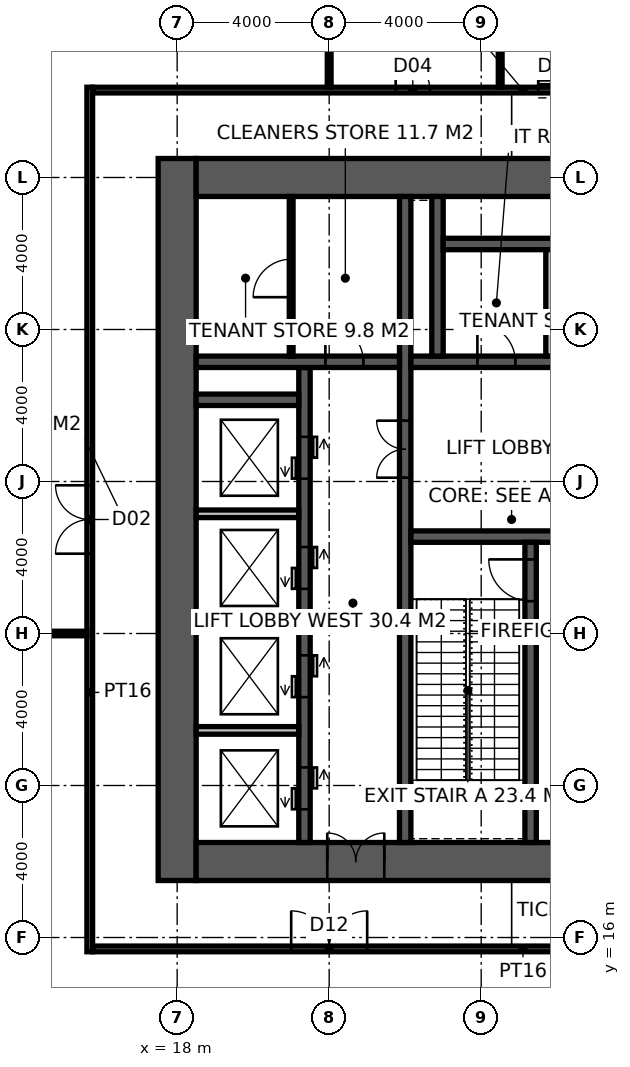
"""IFC4 building model, lengths in metres.
Left out: names, types, materials, properties, quantities, classifications, styles, units other than length and angle.
Written with IfcOpenShell. Run it as: python <this file> out.ifc"""

import sys

from ifc_helpers import new_model, si_unit, direction, frame, frame_2d, origin, place, context, subcontext, project, spatial, rectangle, extrude, element, fill, save


model = new_model("IFC4")
c1 = context("Model", 3, precision=1e-05, world=origin(), true_north=direction((0.0, 1.0)))
c2 = subcontext(c1, "Body", "Model", "MODEL_VIEW")
j1 = project(units=[si_unit("LENGTHUNIT", "METRE"), si_unit("PLANEANGLEUNIT", "RADIAN")], contexts=[c1])
p1 = place(None, origin())
s1 = spatial("IfcSite", under=j1, at=p1, CompositionType="ELEMENT")
p2 = place(p1, origin())
s2 = spatial("IfcBuilding", under=s1, at=p2, CompositionType="ELEMENT")
p3 = place(p2, frame((0.0, 0.0, 298.2)))
s3 = spatial("IfcBuildingStorey", under=s2, at=p3, CompositionType="ELEMENT", Elevation=298.2)
p4 = place(p3, frame((18.0, 17.5, -0.15), z_axis=(0.0, 0.0, 1.0), x_axis=(0.0, 1.0, 0.0)))
e1 = element("IfcWall", 1, at=p4, inside=s3, PredefinedType="SHEAR", context=c2, shape_type="SweptSolid", body=[
    extrude(rectangle(XDim=19.0, YDim=1.0, at=frame_2d((9.5, 0.0))), origin(), (0.0, 0.0, 1.0), 5.85),
])
p5 = place(p3, frame((18.5, 18.0, -0.15), z_axis=(0.0, 0.0, 1.0), x_axis=(1.0, 0.0, 0.0)))
e2 = element("IfcWall", 2, at=p5, inside=s3, PredefinedType="SHEAR", context=c2, shape_type="SweptSolid", body=[
    extrude(rectangle(XDim=17.6, YDim=1.0, at=frame_2d((8.8, 0.0))), origin(), (0.0, 0.0, 1.0), 5.85),
])
p6 = place(p5, frame((3.45, 0.0, 0.15)))
e3 = element("IfcOpeningElement", 3, at=p6, cuts=e2, PredefinedType="OPENING", context=c2, shape_type="SweptSolid", body=[
    extrude(rectangle(XDim=1.5, YDim=2.4, at=frame_2d((0.75, 1.2))), frame((0.0, 0.51, 0.0), z_axis=(0.0, -1.0, 0.0), x_axis=(1.0, 0.0, 0.0)), (0.0, 0.0, 1.0), 1.02),
])
p7 = place(p3, frame((18.5, 36.0, -0.15), z_axis=(0.0, 0.0, 1.0), x_axis=(1.0, 0.0, 0.0)))
e4 = element("IfcWall", 4, at=p7, inside=s3, PredefinedType="SHEAR", context=c2, shape_type="SweptSolid", body=[
    extrude(rectangle(XDim=17.6, YDim=1.0, at=frame_2d((8.8, 0.0))), origin(), (0.0, 0.0, 1.0), 5.85),
])
p8 = place(p3, frame((24.0, 18.5, -0.15), z_axis=(0.0, 0.0, 1.0), x_axis=(0.0, 1.0, 0.0)))
e5 = element("IfcWall", 5, at=p8, inside=s3, PredefinedType="SHEAR", context=c2, shape_type="SweptSolid", body=[
    extrude(rectangle(XDim=17.0, YDim=0.3, at=frame_2d((8.5, 0.0))), origin(), (0.0, 0.0, 1.0), 5.85),
])
p9 = place(p8, frame((9.6, 0.0, 0.15)))
e6 = element("IfcOpeningElement", 6, at=p9, cuts=e5, PredefinedType="OPENING", context=c2, shape_type="SweptSolid", body=[
    extrude(rectangle(XDim=1.5, YDim=2.4, at=frame_2d((0.75, 1.2))), frame((0.0, 0.16, 0.0), z_axis=(0.0, -1.0, 0.0), x_axis=(1.0, 0.0, 0.0)), (0.0, 0.0, 1.0), 0.32),
])
p10 = place(p3, frame((24.15, 26.55, -0.15), z_axis=(0.0, 0.0, 1.0), x_axis=(1.0, 0.0, 0.0)))
e7 = element("IfcWall", 7, at=p10, inside=s3, PredefinedType="SHEAR", context=c2, shape_type="SweptSolid", body=[
    extrude(rectangle(XDim=11.25, YDim=0.3, at=frame_2d((5.625, 0.0))), origin(), (0.0, 0.0, 1.0), 5.85),
])
p11 = place(p10, frame((9.2, 0.0, 0.15)))
e8 = element("IfcOpeningElement", 8, at=p11, cuts=e7, PredefinedType="OPENING", context=c2, shape_type="SweptSolid", body=[
    extrude(rectangle(XDim=1.1, YDim=2.2, at=frame_2d((0.55, 1.1))), frame((0.0, 0.16, 0.0), z_axis=(0.0, -1.0, 0.0), x_axis=(1.0, 0.0, 0.0)), (0.0, 0.0, 1.0), 0.32),
])
p12 = place(p10, frame((4.9, 0.0, 0.15)))
e9 = element("IfcOpeningElement", 9, at=p12, cuts=e7, PredefinedType="OPENING", context=c2, shape_type="SweptSolid", body=[
    extrude(rectangle(XDim=1.5, YDim=2.4, at=frame_2d((0.75, 1.2))), frame((0.0, 0.16, 0.0), z_axis=(0.0, -1.0, 0.0), x_axis=(1.0, 0.0, 0.0)), (0.0, 0.0, 1.0), 0.32),
])
p13 = place(p3, frame((27.3, 18.5, -0.15), z_axis=(0.0, 0.0, 1.0), x_axis=(0.0, 1.0, 0.0)))
e10 = element("IfcWall", 10, at=p13, inside=s3, PredefinedType="SHEAR", context=c2, shape_type="SweptSolid", body=[
    extrude(rectangle(XDim=7.9, YDim=0.3, at=frame_2d((3.95, 0.0))), origin(), (0.0, 0.0, 1.0), 5.85),
])
p14 = place(p13, frame((6.35, 0.0, 0.15)))
e11 = element("IfcOpeningElement", 11, at=p14, cuts=e10, PredefinedType="OPENING", context=c2, shape_type="SweptSolid", body=[
    extrude(rectangle(XDim=1.1, YDim=2.2, at=frame_2d((0.55, 1.1))), frame((0.0, 0.16, 0.0), z_axis=(0.0, -1.0, 0.0), x_axis=(1.0, 0.0, 0.0)), (0.0, 0.0, 1.0), 0.32),
])
p15 = place(p3, frame((24.15, 31.15, -0.15), z_axis=(0.0, 0.0, 1.0), x_axis=(1.0, 0.0, 0.0)))
e12 = element("IfcWall", 12, at=p15, inside=s3, PredefinedType="SHEAR", context=c2, shape_type="SweptSolid", body=[
    extrude(rectangle(XDim=11.25, YDim=0.3, at=frame_2d((5.625, 0.0))), origin(), (0.0, 0.0, 1.0), 5.85),
])
p16 = place(p15, frame((1.75, 0.0, 0.15)))
e13 = element("IfcOpeningElement", 13, at=p16, cuts=e12, PredefinedType="OPENING", context=c2, shape_type="SweptSolid", body=[
    extrude(rectangle(XDim=1.0, YDim=2.2, at=frame_2d((0.5, 1.1))), frame((0.0, 0.16, 0.0), z_axis=(0.0, -1.0, 0.0), x_axis=(1.0, 0.0, 0.0)), (0.0, 0.0, 1.0), 0.32),
])
p17 = place(p15, frame((4.55, 0.0, 0.15)))
e14 = element("IfcOpeningElement", 14, at=p17, cuts=e12, PredefinedType="OPENING", context=c2, shape_type="SweptSolid", body=[
    extrude(rectangle(XDim=1.0, YDim=2.2, at=frame_2d((0.5, 1.1))), frame((0.0, 0.16, 0.0), z_axis=(0.0, -1.0, 0.0), x_axis=(1.0, 0.0, 0.0)), (0.0, 0.0, 1.0), 0.32),
])
p18 = place(p15, frame((7.25, 0.0, 0.15)))
e15 = element("IfcOpeningElement", 15, at=p18, cuts=e12, PredefinedType="OPENING", context=c2, shape_type="SweptSolid", body=[
    extrude(rectangle(XDim=1.4, YDim=2.4, at=frame_2d((0.7, 1.2))), frame((0.0, 0.16, 0.0), z_axis=(0.0, -1.0, 0.0), x_axis=(1.0, 0.0, 0.0)), (0.0, 0.0, 1.0), 0.32),
])
p19 = place(p3, frame((21.35, 18.5, -0.15), z_axis=(0.0, 0.0, 1.0), x_axis=(0.0, 1.0, 0.0)))
e16 = element("IfcWall", 16, at=p19, inside=s3, PredefinedType="SHEAR", context=c2, shape_type="SweptSolid", body=[
    extrude(rectangle(XDim=12.5, YDim=0.3, at=frame_2d((6.25, 0.0))), origin(), (0.0, 0.0, 1.0), 5.85),
])
p20 = place(p19, frame((0.875, 0.0, 0.15)))
e17 = element("IfcOpeningElement", 17, at=p20, cuts=e16, PredefinedType="OPENING", context=c2, shape_type="SweptSolid", body=[
    extrude(rectangle(XDim=1.1, YDim=2.2, at=frame_2d((0.55, 1.1))), frame((0.0, 0.16, 0.0), z_axis=(0.0, -1.0, 0.0), x_axis=(1.0, 0.0, 0.0)), (0.0, 0.0, 1.0), 0.32),
])
p21 = place(p19, frame((3.825, 0.0, 0.15)))
e18 = element("IfcOpeningElement", 18, at=p21, cuts=e16, PredefinedType="OPENING", context=c2, shape_type="SweptSolid", body=[
    extrude(rectangle(XDim=1.1, YDim=2.2, at=frame_2d((0.55, 1.1))), frame((0.0, 0.16, 0.0), z_axis=(0.0, -1.0, 0.0), x_axis=(1.0, 0.0, 0.0)), (0.0, 0.0, 1.0), 0.32),
])
p22 = place(p19, frame((6.675, 0.0, 0.15)))
e19 = element("IfcOpeningElement", 19, at=p22, cuts=e16, PredefinedType="OPENING", context=c2, shape_type="SweptSolid", body=[
    extrude(rectangle(XDim=1.1, YDim=2.2, at=frame_2d((0.55, 1.1))), frame((0.0, 0.16, 0.0), z_axis=(0.0, -1.0, 0.0), x_axis=(1.0, 0.0, 0.0)), (0.0, 0.0, 1.0), 0.32),
])
p23 = place(p19, frame((9.575, 0.0, 0.15)))
e20 = element("IfcOpeningElement", 20, at=p23, cuts=e16, PredefinedType="OPENING", context=c2, shape_type="SweptSolid", body=[
    extrude(rectangle(XDim=1.1, YDim=2.2, at=frame_2d((0.55, 1.1))), frame((0.0, 0.16, 0.0), z_axis=(0.0, -1.0, 0.0), x_axis=(1.0, 0.0, 0.0)), (0.0, 0.0, 1.0), 0.32),
])
p24 = place(p3, frame((18.5, 31.15, -0.15), z_axis=(0.0, 0.0, 1.0), x_axis=(1.0, 0.0, 0.0)))
e21 = element("IfcWall", 21, at=p24, inside=s3, PredefinedType="SHEAR", context=c2, shape_type="SweptSolid", body=[
    extrude(rectangle(XDim=5.35, YDim=0.3, at=frame_2d((2.675, 0.0))), origin(), (0.0, 0.0, 1.0), 5.85),
])
p25 = place(p24, frame((3.4, 0.0, 0.15)))
e22 = element("IfcOpeningElement", 22, at=p25, cuts=e21, PredefinedType="OPENING", context=c2, shape_type="SweptSolid", body=[
    extrude(rectangle(XDim=1.0, YDim=2.2, at=frame_2d((0.5, 1.1))), frame((0.0, 0.16, 0.0), z_axis=(0.0, -1.0, 0.0), x_axis=(1.0, 0.0, 0.0)), (0.0, 0.0, 1.0), 0.32),
])
p26 = place(p3, frame((18.5, 30.15, -0.15), z_axis=(0.0, 0.0, 1.0), x_axis=(1.0, 0.0, 0.0)))
e23 = element("IfcWall", 23, at=p26, inside=s3, PredefinedType="SHEAR", context=c2, shape_type="SweptSolid", body=[
    extrude(rectangle(XDim=2.7, YDim=0.3, at=frame_2d((1.35, 0.0))), origin(), (0.0, 0.0, 1.0), 5.85),
])
p27 = place(p3, frame((24.85, 31.3, -0.15), z_axis=(0.0, 0.0, 1.0), x_axis=(0.0, 1.0, 0.0)))
e24 = element("IfcWall", 24, at=p27, inside=s3, PredefinedType="SHEAR", context=c2, shape_type="SweptSolid", body=[
    extrude(rectangle(XDim=4.2, YDim=0.3, at=frame_2d((2.1, 0.0))), origin(), (0.0, 0.0, 1.0), 5.85),
])
p28 = place(p3, frame((25.0, 34.25, -0.15), z_axis=(0.0, 0.0, 1.0), x_axis=(1.0, 0.0, 0.0)))
e25 = element("IfcWall", 25, at=p28, inside=s3, PredefinedType="SHEAR", context=c2, shape_type="SweptSolid", body=[
    extrude(rectangle(XDim=8.6, YDim=0.3, at=frame_2d((4.3, 0.0))), origin(), (0.0, 0.0, 1.0), 5.85),
])
p29 = place(p3, frame((27.8, 31.3, 0.0), z_axis=(0.0, 0.0, 1.0), x_axis=(0.0, 1.0, 0.0)))
e26 = element("IfcWall", 26, at=p29, inside=s3, PredefinedType="SOLIDWALL", context=c2, shape_type="SweptSolid", body=[
    extrude(rectangle(XDim=2.8, YDim=0.2, at=frame_2d((1.4, 0.0))), origin(), (0.0, 0.0, 1.0), 5.7),
])
for number, where, z_axis, x_axis in (
    (27, (18.5, 21.45, -0.15), (0.0, 0.0, 1.0), (1.0, 0.0, 0.0)),
    (28, (18.5, 24.3, -0.15), (0.0, 0.0, 1.0), (1.0, 0.0, 0.0)),
    (29, (18.5, 27.15, -0.15), (0.0, 0.0, 1.0), (1.0, 0.0, 0.0)),
):
    element("IfcWall", number, at=place(p3, frame(where, z_axis=z_axis, x_axis=x_axis)), inside=s3, PredefinedType="SOLIDWALL", context=c2, shape_type="SweptSolid", body=[
        extrude(rectangle(XDim=2.7, YDim=0.2, at=frame_2d((1.35, 0.0))), origin(), (0.0, 0.0, 1.0), 5.85),
    ])
p30 = place(p3, frame((21.0, 31.3, 0.0), z_axis=(0.0, 0.0, 1.0), x_axis=(0.0, 1.0, 0.0)))
e30 = element("IfcWall", 30, at=p30, inside=s3, PredefinedType="PARTITIONING", context=c2, shape_type="SweptSolid", body=[
    extrude(rectangle(XDim=4.2, YDim=0.1, at=frame_2d((2.1, 0.0))), origin(), (0.0, 0.0, 1.0), 5.7),
])
p31 = place(p30, frame((1.55, 0.0, 0.0)))
e31 = element("IfcOpeningElement", 31, at=p31, cuts=e30, PredefinedType="OPENING", context=c2, shape_type="SweptSolid", body=[
    extrude(rectangle(XDim=1.0, YDim=2.2, at=frame_2d((0.5, 1.1))), frame((0.0, 0.06, 0.0), z_axis=(0.0, -1.0, 0.0), x_axis=(1.0, 0.0, 0.0)), (0.0, 0.0, 1.0), 0.12),
])
p32 = place(p3, frame((15.7, 15.625, 0.0), z_axis=(0.0, 0.0, 1.0), x_axis=(0.0, 1.0, 0.0)))
e32 = element("IfcWall", 32, at=p32, inside=s3, PredefinedType="PARTITIONING", context=c2, shape_type="SweptSolid", body=[
    extrude(rectangle(XDim=22.75, YDim=0.15, at=frame_2d((11.375, 0.0))), origin(), (0.0, 0.0, 1.0), 5.7),
])
p33 = place(p32, frame((10.475, 0.0, 0.0)))
e33 = element("IfcOpeningElement", 33, at=p33, cuts=e32, PredefinedType="OPENING", context=c2, shape_type="SweptSolid", body=[
    extrude(rectangle(XDim=1.8, YDim=2.4, at=frame_2d((0.9, 1.2))), frame((0.0, 0.085, 0.0), z_axis=(0.0, -1.0, 0.0), x_axis=(1.0, 0.0, 0.0)), (0.0, 0.0, 1.0), 0.17),
])
p34 = place(p3, frame((15.775, 15.7, 0.0), z_axis=(0.0, 0.0, 1.0), x_axis=(1.0, 0.0, 0.0)))
e34 = element("IfcWall", 34, at=p34, inside=s3, PredefinedType="PARTITIONING", context=c2, shape_type="SweptSolid", body=[
    extrude(rectangle(XDim=22.65, YDim=0.15, at=frame_2d((11.325, 0.0))), origin(), (0.0, 0.0, 1.0), 5.7),
])
p35 = place(p34, frame((5.225, 0.0, 0.0)))
e35 = element("IfcOpeningElement", 35, at=p35, cuts=e34, PredefinedType="OPENING", context=c2, shape_type="SweptSolid", body=[
    extrude(rectangle(XDim=2.0, YDim=2.7, at=frame_2d((1.0, 1.35))), frame((0.0, 0.085, 0.0), z_axis=(0.0, -1.0, 0.0), x_axis=(1.0, 0.0, 0.0)), (0.0, 0.0, 1.0), 0.17),
])
p36 = place(p3, frame((15.775, 38.3, 0.0), z_axis=(0.0, 0.0, 1.0), x_axis=(1.0, 0.0, 0.0)))
e36 = element("IfcWall", 36, at=p36, inside=s3, PredefinedType="PARTITIONING", context=c2, shape_type="SweptSolid", body=[
    extrude(rectangle(XDim=22.65, YDim=0.15, at=frame_2d((11.325, 0.0))), origin(), (0.0, 0.0, 1.0), 5.7),
])
p37 = place(p36, frame((7.975, 0.0, 0.0)))
e37 = element("IfcOpeningElement", 37, at=p37, cuts=e36, PredefinedType="OPENING", context=c2, shape_type="SweptSolid", body=[
    extrude(rectangle(XDim=0.9, YDim=2.1, at=frame_2d((0.45, 1.05))), frame((0.0, 0.085, 0.0), z_axis=(0.0, -1.0, 0.0), x_axis=(1.0, 0.0, 0.0)), (0.0, 0.0, 1.0), 0.17),
])
p38 = place(p36, frame((11.725, 0.0, 0.0)))
e38 = element("IfcOpeningElement", 38, at=p38, cuts=e36, PredefinedType="OPENING", context=c2, shape_type="SweptSolid", body=[
    extrude(rectangle(XDim=1.0, YDim=2.1, at=frame_2d((0.5, 1.05))), frame((0.0, 0.085, 0.0), z_axis=(0.0, -1.0, 0.0), x_axis=(1.0, 0.0, 0.0)), (0.0, 0.0, 1.0), 0.17),
])
p39 = place(p36, frame((15.575, 0.0, 0.0)))
e39 = element("IfcOpeningElement", 39, at=p39, cuts=e36, PredefinedType="OPENING", context=c2, shape_type="SweptSolid", body=[
    extrude(rectangle(XDim=0.9, YDim=2.1, at=frame_2d((0.45, 1.05))), frame((0.0, 0.085, 0.0), z_axis=(0.0, -1.0, 0.0), x_axis=(1.0, 0.0, 0.0)), (0.0, 0.0, 1.0), 0.17),
])
p40 = place(p3, frame((6.3, 24.0, 0.0), z_axis=(0.0, 0.0, 1.0), x_axis=(1.0, 0.0, 0.0)))
e40 = element("IfcWall", 40, at=p40, inside=s3, PredefinedType="PARTITIONING", context=c2, shape_type="SweptSolid", body=[
    extrude(rectangle(XDim=9.325, YDim=0.12, at=frame_2d((4.663, 0.0))), origin(), (0.0, 0.0, 1.0), 4.8),
])
p41 = place(p3, frame((22.0, 38.375, 0.0), z_axis=(0.0, 0.0, 1.0), x_axis=(0.0, 1.0, 0.0)))
e41 = element("IfcWall", 41, at=p41, inside=s3, PredefinedType="PARTITIONING", context=c2, shape_type="SweptSolid", body=[
    extrude(rectangle(XDim=3.675, YDim=0.1, at=frame_2d((1.837, 0.0))), origin(), (0.0, 0.0, 1.0), 4.8),
])
p42 = place(p3, frame((26.5, 38.375, 0.0), z_axis=(0.0, 0.0, 1.0), x_axis=(0.0, 1.0, 0.0)))
e42 = element("IfcWall", 42, at=p42, inside=s3, PredefinedType="PARTITIONING", context=c2, shape_type="SweptSolid", body=[
    extrude(rectangle(XDim=3.575, YDim=0.1, at=frame_2d((1.788, 0.0))), origin(), (0.0, 0.0, 1.0), 5.7),
])
p43 = place(p14, origin())
e43 = element("IfcDoor", 43, at=p43, inside=s3, OperationType="SINGLE_SWING_RIGHT", PredefinedType="DOOR", context=c2, shape_type="SweptSolid", body=[
    extrude(rectangle(XDim=1.1, YDim=2.2, at=frame_2d((0.55, 1.1))), frame((0.0, 0.025, 0.0), z_axis=(0.0, -1.0, 0.0), x_axis=(1.0, 0.0, 0.0)), (0.0, 0.0, 1.0), 0.05),
])
fill(e11, e43)
p44 = place(p9, origin())
e44 = element("IfcDoor", 44, at=p44, inside=s3, OperationType="DOUBLE_DOOR_DOUBLE_SWING", PredefinedType="DOOR", context=c2, shape_type="SweptSolid", body=[
    extrude(rectangle(XDim=1.5, YDim=2.4, at=frame_2d((0.75, 1.2))), frame((0.0, 0.025, 0.0), z_axis=(0.0, -1.0, 0.0), x_axis=(1.0, 0.0, 0.0)), (0.0, 0.0, 1.0), 0.05),
])
fill(e6, e44)
p45 = place(p25, origin())
e45 = element("IfcDoor", 45, at=p45, inside=s3, OperationType="SINGLE_SWING_LEFT", PredefinedType="DOOR", context=c2, shape_type="SweptSolid", body=[
    extrude(rectangle(XDim=1.0, YDim=2.2, at=frame_2d((0.5, 1.1))), frame((0.0, 0.025, 0.0), z_axis=(0.0, -1.0, 0.0), x_axis=(1.0, 0.0, 0.0)), (0.0, 0.0, 1.0), 0.05),
])
fill(e22, e45)
p46 = place(p31, origin())
e46 = element("IfcDoor", 46, at=p46, inside=s3, OperationType="SINGLE_SWING_LEFT", PredefinedType="DOOR", context=c2, shape_type="SweptSolid", body=[
    extrude(rectangle(XDim=1.0, YDim=2.2, at=frame_2d((0.5, 1.1))), frame((0.0, 0.025, 0.0), z_axis=(0.0, -1.0, 0.0), x_axis=(1.0, 0.0, 0.0)), (0.0, 0.0, 1.0), 0.05),
])
fill(e31, e46)
p47 = place(p16, origin())
e47 = element("IfcDoor", 47, at=p47, inside=s3, OperationType="SINGLE_SWING_LEFT", PredefinedType="DOOR", context=c2, shape_type="SweptSolid", body=[
    extrude(rectangle(XDim=1.0, YDim=2.2, at=frame_2d((0.5, 1.1))), frame((0.0, 0.025, 0.0), z_axis=(0.0, -1.0, 0.0), x_axis=(1.0, 0.0, 0.0)), (0.0, 0.0, 1.0), 0.05),
])
fill(e13, e47)
p48 = place(p6, origin())
e48 = element("IfcDoor", 48, at=p48, inside=s3, OperationType="DOUBLE_DOOR_DOUBLE_SWING", PredefinedType="DOOR", context=c2, shape_type="SweptSolid", body=[
    extrude(rectangle(XDim=1.5, YDim=2.4, at=frame_2d((0.75, 1.2))), frame((0.0, 0.025, 0.0), z_axis=(0.0, -1.0, 0.0), x_axis=(1.0, 0.0, 0.0)), (0.0, 0.0, 1.0), 0.05),
])
fill(e3, e48)
p49 = place(p35, origin())
e49 = element("IfcDoor", 49, at=p49, inside=s3, OperationType="DOUBLE_DOOR_DOUBLE_SWING", PredefinedType="DOOR", context=c2, shape_type="SweptSolid", body=[
    extrude(rectangle(XDim=2.0, YDim=2.7, at=frame_2d((1.0, 1.35))), frame((0.0, 0.025, 0.0), z_axis=(0.0, -1.0, 0.0), x_axis=(1.0, 0.0, 0.0)), (0.0, 0.0, 1.0), 0.05),
])
fill(e35, e49)
p50 = place(p37, origin())
e50 = element("IfcDoor", 50, at=p50, inside=s3, OperationType="SINGLE_SWING_LEFT", PredefinedType="DOOR", context=c2, shape_type="SweptSolid", body=[
    extrude(rectangle(XDim=0.9, YDim=2.1, at=frame_2d((0.45, 1.05))), frame((0.0, 0.025, 0.0), z_axis=(0.0, -1.0, 0.0), x_axis=(1.0, 0.0, 0.0)), (0.0, 0.0, 1.0), 0.05),
])
fill(e37, e50)
p51 = place(p38, origin())
e51 = element("IfcDoor", 51, at=p51, inside=s3, OperationType="SLIDING_TO_LEFT", PredefinedType="DOOR", context=c2, shape_type="SweptSolid", body=[
    extrude(rectangle(XDim=1.0, YDim=2.1, at=frame_2d((0.5, 1.05))), frame((0.0, 0.025, 0.0), z_axis=(0.0, -1.0, 0.0), x_axis=(1.0, 0.0, 0.0)), (0.0, 0.0, 1.0), 0.05),
])
fill(e38, e51)
p52 = place(p33, origin())
e52 = element("IfcDoor", 52, at=p52, inside=s3, OperationType="DOUBLE_DOOR_DOUBLE_SWING", PredefinedType="DOOR", context=c2, shape_type="SweptSolid", body=[
    extrude(rectangle(XDim=1.8, YDim=2.4, at=frame_2d((0.9, 1.2))), frame((0.0, 0.025, 0.0), z_axis=(0.0, -1.0, 0.0), x_axis=(1.0, 0.0, 0.0)), (0.0, 0.0, 1.0), 0.05),
])
fill(e33, e52)
p53 = place(p20, origin())
e53 = element("IfcDoor", 53, at=p53, inside=s3, OperationType="DOUBLE_DOOR_SLIDING", PredefinedType="DOOR", context=c2, shape_type="SweptSolid", body=[
    extrude(rectangle(XDim=1.1, YDim=2.2, at=frame_2d((0.55, 1.1))), frame((0.0, 0.025, 0.0), z_axis=(0.0, -1.0, 0.0), x_axis=(1.0, 0.0, 0.0)), (0.0, 0.0, 1.0), 0.05),
])
fill(e17, e53)
p54 = place(p21, origin())
e54 = element("IfcDoor", 54, at=p54, inside=s3, OperationType="DOUBLE_DOOR_SLIDING", PredefinedType="DOOR", context=c2, shape_type="SweptSolid", body=[
    extrude(rectangle(XDim=1.1, YDim=2.2, at=frame_2d((0.55, 1.1))), frame((0.0, 0.025, 0.0), z_axis=(0.0, -1.0, 0.0), x_axis=(1.0, 0.0, 0.0)), (0.0, 0.0, 1.0), 0.05),
])
fill(e18, e54)
p55 = place(p22, origin())
e55 = element("IfcDoor", 55, at=p55, inside=s3, OperationType="DOUBLE_DOOR_SLIDING", PredefinedType="DOOR", context=c2, shape_type="SweptSolid", body=[
    extrude(rectangle(XDim=1.1, YDim=2.2, at=frame_2d((0.55, 1.1))), frame((0.0, 0.025, 0.0), z_axis=(0.0, -1.0, 0.0), x_axis=(1.0, 0.0, 0.0)), (0.0, 0.0, 1.0), 0.05),
])
fill(e19, e55)
p56 = place(p23, origin())
e56 = element("IfcDoor", 56, at=p56, inside=s3, OperationType="DOUBLE_DOOR_SLIDING", PredefinedType="DOOR", context=c2, shape_type="SweptSolid", body=[
    extrude(rectangle(XDim=1.1, YDim=2.2, at=frame_2d((0.55, 1.1))), frame((0.0, 0.025, 0.0), z_axis=(0.0, -1.0, 0.0), x_axis=(1.0, 0.0, 0.0)), (0.0, 0.0, 1.0), 0.05),
])
fill(e20, e56)
save(model, sys.argv[1])
